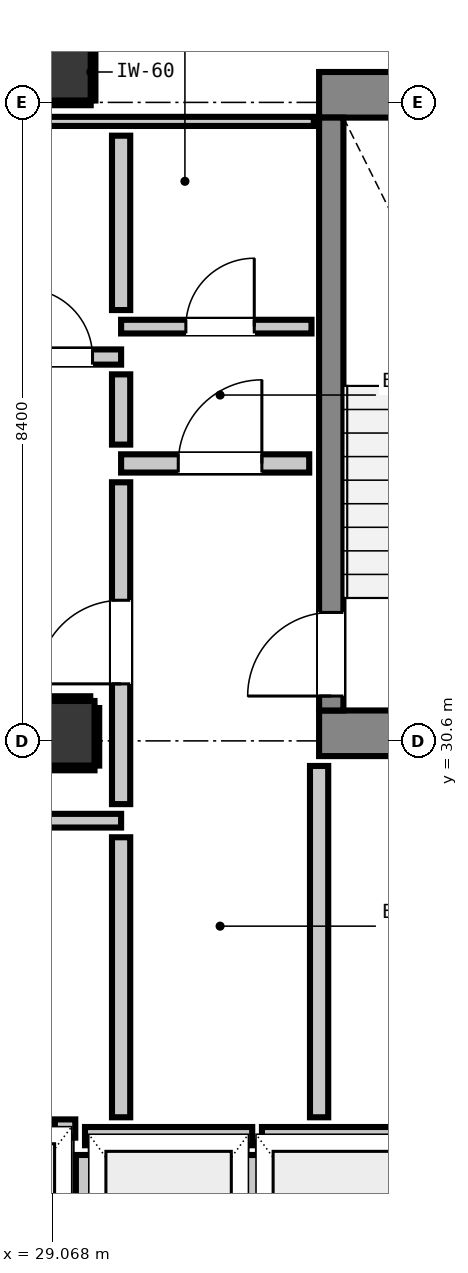
"""IFC4 building model, lengths in metres.
Left out: names, types, materials, properties, quantities, classifications, styles, units other than length and angle.
Written with IfcOpenShell. Run it as: python <this file> out.ifc"""

import sys

from ifc_helpers import new_model, si_unit, direction, frame, frame_2d, origin, origin_2d, place, context, subcontext, project, spatial, rectangle, extrude, element, fill, save


model = new_model("IFC4")
c1 = context("Model", 3, precision=1e-05, world=origin(), true_north=direction((0.0, 1.0)))
c2 = subcontext(c1, "Body", "Model", "MODEL_VIEW")
j1 = project(units=[si_unit("LENGTHUNIT", "METRE"), si_unit("PLANEANGLEUNIT", "RADIAN")], contexts=[c1])
p1 = place(None, origin())
s1 = spatial("IfcSite", under=j1, at=p1, CompositionType="ELEMENT")
p2 = place(p1, origin())
s2 = spatial("IfcBuilding", under=s1, at=p2, CompositionType="ELEMENT")
p3 = place(p2, frame((0.0, 0.0, 210.08)))
s3 = spatial("IfcBuildingStorey", under=s2, at=p3, CompositionType="ELEMENT", Elevation=210.08)
p4 = place(p3, frame((29.2, 39.4, 0.0), z_axis=(0.0, 0.0, 1.0), x_axis=(1.0, 0.0, 0.0)))
e1 = element("IfcColumn", 1, at=p4, inside=s3, PredefinedType="COLUMN", context=c2, shape_type="SweptSolid", body=[
    extrude(rectangle(XDim=0.75, YDim=0.75, at=origin_2d()), origin(), (0.0, 0.0, 1.0), 3.32),
])
p5 = place(p3, frame((32.58, 39.1, 0.0), z_axis=(0.0, 0.0, 1.0), x_axis=(1.0, 0.0, 0.0)))
e2 = element("IfcWall", 2, at=p5, inside=s3, PredefinedType="SHEAR", context=c2, shape_type="SweptSolid", body=[
    extrude(rectangle(XDim=4.08, YDim=0.6, at=frame_2d((2.04, 0.0))), origin(), (0.0, 0.0, 1.0), 3.32),
])
p6 = place(p3, frame((32.58, 30.7, 0.0), z_axis=(0.0, 0.0, 1.0), x_axis=(1.0, 0.0, 0.0)))
e3 = element("IfcWall", 3, at=p6, inside=s3, PredefinedType="SHEAR", context=c2, shape_type="SweptSolid", body=[
    extrude(rectangle(XDim=3.54, YDim=0.6, at=frame_2d((1.77, 0.0))), origin(), (0.0, 0.0, 1.0), 3.32),
])
p7 = place(p3, frame((32.74, 31.0, 0.0), z_axis=(0.0, 0.0, 1.0), x_axis=(0.0, 1.0, 0.0)))
e4 = element("IfcWall", 4, at=p7, inside=s3, PredefinedType="SHEAR", context=c2, shape_type="SweptSolid", body=[
    extrude(rectangle(XDim=7.8, YDim=0.32, at=frame_2d((3.9, 0.0))), origin(), (0.0, 0.0, 1.0), 3.32),
])
p8 = place(p7, frame((0.19, 0.0, 0.0)))
e5 = element("IfcOpeningElement", 5, at=p8, cuts=e4, PredefinedType="OPENING", context=c2, shape_type="SweptSolid", body=[
    extrude(rectangle(XDim=1.1, YDim=2.15, at=frame_2d((0.55, 1.075))), frame((0.0, 0.17, 0.0), z_axis=(0.0, -1.0, 0.0), x_axis=(1.0, 0.0, 0.0)), (0.0, 0.0, 1.0), 0.34),
])
p9 = place(p3, frame((29.2, 30.7, 0.0), z_axis=(0.0, 0.0, 1.0), x_axis=(1.0, 0.0, 0.0)))
e6 = element("IfcColumn", 6, at=p9, inside=s3, PredefinedType="COLUMN", context=c2, shape_type="SweptSolid", body=[
    extrude(rectangle(XDim=0.85, YDim=0.85, at=origin_2d()), origin(), (0.0, 0.0, 1.0), 3.32),
])
p10 = place(p3, frame((29.5, 25.4, 0.0), z_axis=(0.0, 0.0, 1.0), x_axis=(1.0, 0.0, 0.0)))
e7 = element("IfcWall", 7, at=p10, inside=s3, PredefinedType="PARTITIONING", context=c2, shape_type="SweptSolid", body=[
    extrude(rectangle(XDim=2.2, YDim=0.24, at=frame_2d((1.1, 0.0))), origin(), (0.0, 0.0, 1.0), 3.1),
])
p11 = place(p3, frame((29.5, 22.848, 0.0), z_axis=(0.0, 0.0, 1.0), x_axis=(0.0, 1.0, 0.0)))
e8 = element("IfcWall", 8, at=p11, inside=s3, PredefinedType="PARTITIONING", context=c2, shape_type="SweptSolid", body=[
    extrude(rectangle(XDim=2.304, YDim=0.24, at=frame_2d((1.152, 0.0))), origin(), (0.0, 0.0, 1.0), 2.335),
])
p12 = place(p3, frame((31.7, 22.848, 0.0), z_axis=(0.0, 0.0, 1.0), x_axis=(0.0, 1.0, 0.0)))
e9 = element("IfcWall", 9, at=p12, inside=s3, PredefinedType="PARTITIONING", context=c2, shape_type="SweptSolid", body=[
    extrude(rectangle(XDim=2.304, YDim=0.24, at=frame_2d((1.152, 0.0))), origin(), (0.0, 0.0, 1.0), 3.1),
])
p13 = place(p3, frame((31.828, 25.4, 0.0), z_axis=(0.0, 0.0, 1.0), x_axis=(1.0, 0.0, 0.0)))
e10 = element("IfcWall", 10, at=p13, inside=s3, PredefinedType="PARTITIONING", context=c2, shape_type="SweptSolid", body=[
    extrude(rectangle(XDim=2.072, YDim=0.24, at=frame_2d((1.036, 0.0))), origin(), (0.0, 0.0, 1.0), 3.1),
])
p14 = place(p3, frame((29.103, 25.5, 0.0), z_axis=(0.0, 0.0, 1.0), x_axis=(1.0, 0.0, 0.0)))
e11 = element("IfcWall", 11, at=p14, inside=s3, PredefinedType="PARTITIONING", context=c2, shape_type="SweptSolid", body=[
    extrude(rectangle(XDim=0.269, YDim=0.24, at=frame_2d((0.135, 0.0))), origin(), (0.0, 0.0, 1.0), 3.1),
])
p15 = place(p3, frame((29.975, 34.25, 0.0), z_axis=(0.0, 0.0, 1.0), x_axis=(1.0, 0.0, 0.0)))
e12 = element("IfcWall", 12, at=p15, inside=s3, PredefinedType="PARTITIONING", context=c2, shape_type="SweptSolid", body=[
    extrude(rectangle(XDim=2.475, YDim=0.24, at=frame_2d((1.237, 0.0))), origin(), (0.0, 0.0, 1.0), 3.1),
])
p16 = place(p15, frame((0.752, 0.0, 0.0)))
e13 = element("IfcOpeningElement", 13, at=p16, cuts=e12, PredefinedType="OPENING", context=c2, shape_type="SweptSolid", body=[
    extrude(rectangle(XDim=1.1, YDim=2.15, at=frame_2d((0.55, 1.075))), frame((0.0, 0.13, 0.0), z_axis=(0.0, -1.0, 0.0), x_axis=(1.0, 0.0, 0.0)), (0.0, 0.0, 1.0), 0.26),
])
p17 = place(p3, frame((18.95, 35.65, 0.0), z_axis=(0.0, 0.0, 1.0), x_axis=(1.0, 0.0, 0.0)))
e14 = element("IfcWall", 14, at=p17, inside=s3, PredefinedType="PARTITIONING", context=c2, shape_type="SweptSolid", body=[
    extrude(rectangle(XDim=11.025, YDim=0.2, at=frame_2d((5.513, 0.0))), origin(), (0.0, 0.0, 1.0), 3.1),
])
p18 = place(p17, frame((9.749, 0.0, 0.0)))
e15 = element("IfcOpeningElement", 15, at=p18, cuts=e14, PredefinedType="OPENING", context=c2, shape_type="SweptSolid", body=[
    extrude(rectangle(XDim=0.9, YDim=2.1, at=frame_2d((0.45, 1.05))), frame((0.0, 0.11, 0.0), z_axis=(0.0, -1.0, 0.0), x_axis=(1.0, 0.0, 0.0)), (0.0, 0.0, 1.0), 0.22),
])
p19 = place(p3, frame((28.593, 29.55, 0.0), z_axis=(0.0, 0.0, 1.0), x_axis=(1.0, 0.0, 0.0)))
e16 = element("IfcWall", 16, at=p19, inside=s3, PredefinedType="PARTITIONING", context=c2, shape_type="SweptSolid", body=[
    extrude(rectangle(XDim=1.382, YDim=0.18, at=frame_2d((0.691, 0.0))), origin(), (0.0, 0.0, 1.0), 3.1),
])
p20 = place(p3, frame((29.975, 36.05, 0.0), z_axis=(0.0, 0.0, 1.0), x_axis=(1.0, 0.0, 0.0)))
e17 = element("IfcWall", 17, at=p20, inside=s3, PredefinedType="PARTITIONING", context=c2, shape_type="SweptSolid", body=[
    extrude(rectangle(XDim=2.505, YDim=0.18, at=frame_2d((1.252, 0.0))), origin(), (0.0, 0.0, 1.0), 3.1),
])
p21 = place(p20, frame((0.852, 0.0, 0.0)))
e18 = element("IfcOpeningElement", 18, at=p21, cuts=e17, PredefinedType="OPENING", context=c2, shape_type="SweptSolid", body=[
    extrude(rectangle(XDim=0.9, YDim=2.1, at=frame_2d((0.45, 1.05))), frame((0.0, 0.1, 0.0), z_axis=(0.0, -1.0, 0.0), x_axis=(1.0, 0.0, 0.0)), (0.0, 0.0, 1.0), 0.2),
])
p22 = place(p3, frame((18.95, 38.75, 0.0), z_axis=(0.0, 0.0, 1.0), x_axis=(1.0, 0.0, 0.0)))
e19 = element("IfcWall", 19, at=p22, inside=s3, PredefinedType="PARTITIONING", context=c2, shape_type="SweptSolid", body=[
    extrude(rectangle(XDim=13.56, YDim=0.12, at=frame_2d((6.78, 0.0))), origin(), (0.0, 0.0, 1.0), 3.1),
])
p23 = place(p3, frame((29.975, 25.648, 0.0), z_axis=(0.0, 0.0, 1.0), x_axis=(0.0, 1.0, 0.0)))
e20 = element("IfcWall", 20, at=p23, inside=s3, PredefinedType="PARTITIONING", context=c2, shape_type="SweptSolid", body=[
    extrude(rectangle(XDim=3.684, YDim=0.24, at=frame_2d((1.842, 0.0))), origin(), (0.0, 0.0, 1.0), 3.1),
])
p24 = place(p3, frame((29.975, 29.768, 0.0), z_axis=(0.0, 0.0, 1.0), x_axis=(0.0, 1.0, 0.0)))
e21 = element("IfcWall", 21, at=p24, inside=s3, PredefinedType="PARTITIONING", context=c2, shape_type="SweptSolid", body=[
    extrude(rectangle(XDim=4.234, YDim=0.24, at=frame_2d((2.117, 0.0))), origin(), (0.0, 0.0, 1.0), 3.1),
])
p25 = place(p24, frame((1.582, 0.0, 0.0)))
e22 = element("IfcOpeningElement", 22, at=p25, cuts=e21, PredefinedType="OPENING", context=c2, shape_type="SweptSolid", body=[
    extrude(rectangle(XDim=1.1, YDim=2.15, at=frame_2d((0.55, 1.075))), frame((0.0, 0.13, 0.0), z_axis=(0.0, -1.0, 0.0), x_axis=(1.0, 0.0, 0.0)), (0.0, 0.0, 1.0), 0.26),
])
p26 = place(p3, frame((29.975, 34.498, 0.0), z_axis=(0.0, 0.0, 1.0), x_axis=(0.0, 1.0, 0.0)))
e23 = element("IfcWall", 23, at=p26, inside=s3, PredefinedType="PARTITIONING", context=c2, shape_type="SweptSolid", body=[
    extrude(rectangle(XDim=0.924, YDim=0.24, at=frame_2d((0.462, 0.0))), origin(), (0.0, 0.0, 1.0), 3.1),
])
p27 = place(p3, frame((29.975, 36.268, 0.0), z_axis=(0.0, 0.0, 1.0), x_axis=(0.0, 1.0, 0.0)))
e24 = element("IfcWall", 24, at=p27, inside=s3, PredefinedType="PARTITIONING", context=c2, shape_type="SweptSolid", body=[
    extrude(rectangle(XDim=2.294, YDim=0.24, at=frame_2d((1.147, 0.0))), origin(), (0.0, 0.0, 1.0), 3.1),
])
p28 = place(p3, frame((32.58, 25.648, 0.0), z_axis=(0.0, 0.0, 1.0), x_axis=(0.0, 1.0, 0.0)))
e25 = element("IfcWall", 25, at=p28, inside=s3, PredefinedType="PARTITIONING", context=c2, shape_type="SweptSolid", body=[
    extrude(rectangle(XDim=4.622, YDim=0.24, at=frame_2d((2.311, 0.0))), origin(), (0.0, 0.0, 1.0), 3.1),
])
p29 = place(p3, frame((28.833, 38.993, 0.0), z_axis=(0.0, 0.0, 1.0), x_axis=(1.0, 0.0, 0.0)))
e26 = element("IfcWall", 26, at=p29, inside=s3, PredefinedType="PARTITIONING", context=c2, shape_type="SweptSolid", body=[
    extrude(rectangle(XDim=0.742, YDim=0.06, at=frame_2d((0.371, 0.0))), origin(), (0.0, 0.0, 1.0), 1.45),
])
p30 = place(p3, frame((29.607, 39.025, 0.0), z_axis=(0.0, 0.0, 1.0), x_axis=(0.0, 1.0, 0.0)))
e27 = element("IfcWall", 27, at=p30, inside=s3, PredefinedType="PARTITIONING", context=c2, shape_type="SweptSolid", body=[
    extrude(rectangle(XDim=0.75, YDim=0.06, at=frame_2d((0.375, 0.0))), origin(), (0.0, 0.0, 1.0), 1.45),
])
p31 = place(p3, frame((28.775, 30.243, 0.0), z_axis=(0.0, 0.0, 1.0), x_axis=(1.0, 0.0, 0.0)))
e28 = element("IfcWall", 28, at=p31, inside=s3, PredefinedType="PARTITIONING", context=c2, shape_type="SweptSolid", body=[
    extrude(rectangle(XDim=0.85, YDim=0.06, at=frame_2d((0.425, 0.0))), origin(), (0.0, 0.0, 1.0), 1.45),
])
p32 = place(p3, frame((28.775, 31.157, 0.0), z_axis=(0.0, 0.0, 1.0), x_axis=(1.0, 0.0, 0.0)))
e29 = element("IfcWall", 29, at=p32, inside=s3, PredefinedType="PARTITIONING", context=c2, shape_type="SweptSolid", body=[
    extrude(rectangle(XDim=0.794, YDim=0.06, at=frame_2d((0.397, 0.0))), origin(), (0.0, 0.0, 1.0), 1.45),
])
p33 = place(p3, frame((29.657, 30.275, 0.0), z_axis=(0.0, 0.0, 1.0), x_axis=(0.0, 1.0, 0.0)))
e30 = element("IfcWall", 30, at=p33, inside=s3, PredefinedType="PARTITIONING", context=c2, shape_type="SweptSolid", body=[
    extrude(rectangle(XDim=0.757, YDim=0.06, at=frame_2d((0.378, 0.0))), origin(), (0.0, 0.0, 1.0), 1.45),
])
p34 = place(p8, origin())
e31 = element("IfcDoor", 31, at=p34, inside=s3, OperationType="SINGLE_SWING_LEFT", PredefinedType="DOOR", context=c2, shape_type="SweptSolid", body=[
    extrude(rectangle(XDim=1.1, YDim=2.15, at=frame_2d((0.55, 1.075))), frame((0.0, 0.025, 0.0), z_axis=(0.0, -1.0, 0.0), x_axis=(1.0, 0.0, 0.0)), (0.0, 0.0, 1.0), 0.05),
])
fill(e5, e31)
p35 = place(p25, origin())
e32 = element("IfcDoor", 32, at=p35, inside=s3, OperationType="SINGLE_SWING_LEFT", PredefinedType="DOOR", context=c2, shape_type="SweptSolid", body=[
    extrude(rectangle(XDim=1.1, YDim=2.15, at=frame_2d((0.55, 1.075))), frame((0.0, 0.025, 0.0), z_axis=(0.0, -1.0, 0.0), x_axis=(1.0, 0.0, 0.0)), (0.0, 0.0, 1.0), 0.05),
])
fill(e22, e32)
p36 = place(p16, origin())
e33 = element("IfcDoor", 33, at=p36, inside=s3, OperationType="SINGLE_SWING_RIGHT", PredefinedType="DOOR", context=c2, shape_type="SweptSolid", body=[
    extrude(rectangle(XDim=1.1, YDim=2.15, at=frame_2d((0.55, 1.075))), frame((0.0, 0.025, 0.0), z_axis=(0.0, -1.0, 0.0), x_axis=(1.0, 0.0, 0.0)), (0.0, 0.0, 1.0), 0.05),
])
fill(e13, e33)
p37 = place(p21, origin())
e34 = element("IfcDoor", 34, at=p37, inside=s3, OperationType="SINGLE_SWING_RIGHT", PredefinedType="DOOR", context=c2, shape_type="SweptSolid", body=[
    extrude(rectangle(XDim=0.9, YDim=2.1, at=frame_2d((0.45, 1.05))), frame((0.0, 0.025, 0.0), z_axis=(0.0, -1.0, 0.0), x_axis=(1.0, 0.0, 0.0)), (0.0, 0.0, 1.0), 0.05),
])
fill(e18, e34)
p38 = place(p18, origin())
e35 = element("IfcDoor", 35, at=p38, inside=s3, OperationType="SINGLE_SWING_LEFT", PredefinedType="DOOR", context=c2, shape_type="SweptSolid", body=[
    extrude(rectangle(XDim=0.9, YDim=2.1, at=frame_2d((0.45, 1.05))), frame((0.0, 0.025, 0.0), z_axis=(0.0, -1.0, 0.0), x_axis=(1.0, 0.0, 0.0)), (0.0, 0.0, 1.0), 0.05),
])
fill(e15, e35)
save(model, sys.argv[1])
